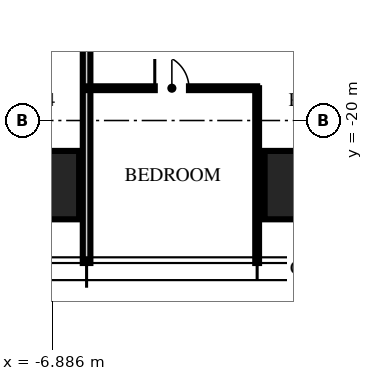
"""IFC4 building model, lengths in metres.
Left out: names, types, materials, properties, quantities, classifications, styles, units other than length and angle.
Written with IfcOpenShell. Run it as: python <this file> out.ifc"""

import sys

from ifc_helpers import new_model, si_unit, direction, frame, frame_2d, origin, origin_2d, place, context, subcontext, project, spatial, rectangle, extrude, element, fill, save


model = new_model("IFC4")
c1 = context("Model", 3, precision=1e-05, world=origin(), true_north=direction((0.0, 1.0)))
c2 = subcontext(c1, "Body", "Model", "MODEL_VIEW")
j1 = project(units=[si_unit("LENGTHUNIT", "METRE"), si_unit("PLANEANGLEUNIT", "RADIAN")], contexts=[c1])
p1 = place(None, origin())
s1 = spatial("IfcSite", under=j1, at=p1, CompositionType="ELEMENT")
p2 = place(p1, origin())
s2 = spatial("IfcBuilding", under=s1, at=p2, CompositionType="ELEMENT")
p3 = place(p2, frame((0.0, 0.0, 297.0)))
s3 = spatial("IfcBuildingStorey", under=s2, at=p3, CompositionType="ELEMENT", Elevation=297.0)
for number, where, z_axis, x_axis in (
    (1, (0.0, -21.7, 0.0), (0.0, 0.0, 1.0), (1.0, 0.0, 0.0)),
    (2, (-7.48, -21.7, 0.0), (0.0, 0.0, 1.0), (1.0, 0.0, 0.0)),
):
    element("IfcColumn", number, at=place(p3, frame(where, z_axis=z_axis, x_axis=x_axis)), inside=s3, PredefinedType="COLUMN", context=c2, shape_type="SweptSolid", body=[
        extrude(rectangle(XDim=2.6, YDim=1.8, at=origin_2d()), origin(), (0.0, 0.0, 1.0), 3.75),
    ])
p4 = place(p3, frame((-5.984, -12.65, 0.0), z_axis=(0.0, 0.0, 1.0), x_axis=(0.0, -1.0, 0.0)))
e3 = element("IfcWall", 3, at=p4, inside=s3, PredefinedType="PARTITIONING", context=c2, shape_type="SweptSolid", body=[
    extrude(rectangle(XDim=11.1, YDim=0.2, at=frame_2d((5.55, 0.0))), origin(), (0.0, 0.0, 1.0), 3.01),
])
p5 = place(p3, frame((-1.496, -19.15, 0.0), z_axis=(0.0, 0.0, 1.0), x_axis=(0.0, -1.0, 0.0)))
e4 = element("IfcWall", 4, at=p5, inside=s3, PredefinedType="PARTITIONING", context=c2, shape_type="SweptSolid", body=[
    extrude(rectangle(XDim=4.6, YDim=0.1, at=frame_2d((2.3, 0.0))), origin(), (0.0, 0.0, 1.0), 3.01),
])
p6 = place(p3, frame((-5.984, -19.15, 0.0), z_axis=(0.0, 0.0, 1.0), x_axis=(1.0, 0.0, 0.0)))
e5 = element("IfcWall", 5, at=p6, inside=s3, PredefinedType="PARTITIONING", context=c2, shape_type="SweptSolid", body=[
    extrude(rectangle(XDim=4.488, YDim=0.1, at=frame_2d((2.244, 0.0))), origin(), (0.0, 0.0, 1.0), 2.91),
])
p7 = place(p6, frame((1.794, 0.0, 0.0)))
e6 = element("IfcOpeningElement", 6, at=p7, cuts=e5, PredefinedType="OPENING", context=c2, shape_type="SweptSolid", body=[
    extrude(rectangle(XDim=0.9, YDim=2.1, at=frame_2d((0.45, 1.05))), frame((0.0, 0.06, 0.0), z_axis=(0.0, -1.0, 0.0), x_axis=(1.0, 0.0, 0.0)), (0.0, 0.0, 1.0), 0.12),
])
p8 = place(p7, origin())
e7 = element("IfcDoor", 7, at=p8, inside=s3, OperationType="SINGLE_SWING_LEFT", PredefinedType="DOOR", context=c2, shape_type="SweptSolid", body=[
    extrude(rectangle(XDim=0.9, YDim=2.1, at=frame_2d((0.45, 1.05))), frame((0.0, 0.025, 0.0), z_axis=(0.0, -1.0, 0.0), x_axis=(1.0, 0.0, 0.0)), (0.0, 0.0, 1.0), 0.05),
])
fill(e6, e7)
save(model, sys.argv[1])
